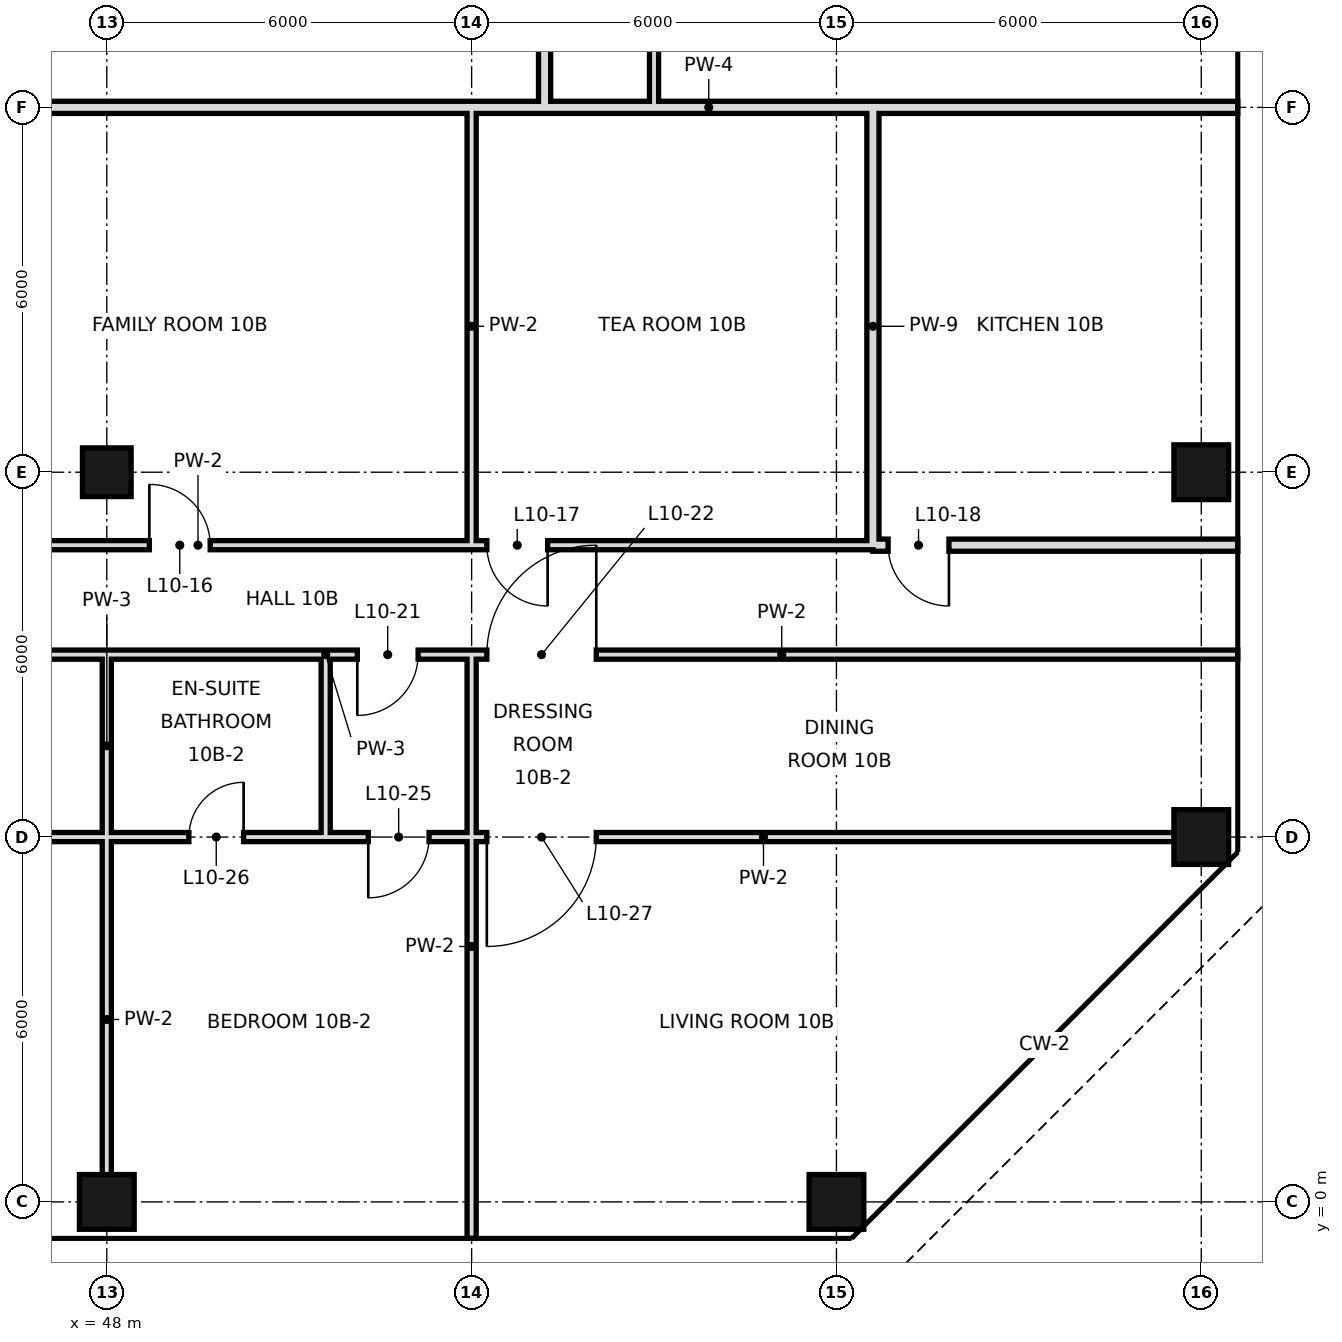
"""IFC4 building model, lengths in metres.
Left out: names, types, materials, properties, quantities, classifications, styles, units other than length and angle.
Written with IfcOpenShell. Run it as: python <this file> out.ifc"""

import sys

from ifc_helpers import new_model, si_unit, direction, frame, frame_2d, origin, origin_2d, place, context, subcontext, project, spatial, rectangle, hollow_rectangle, extrude, element, fill, save


model = new_model("IFC4")
c1 = context("Model", 3, precision=1e-05, world=origin(), true_north=direction((0.0, 1.0)))
c2 = subcontext(c1, "Body", "Model", "MODEL_VIEW")
j1 = project(units=[si_unit("LENGTHUNIT", "METRE"), si_unit("PLANEANGLEUNIT", "RADIAN")], contexts=[c1])
p1 = place(None, origin())
s1 = spatial("IfcSite", under=j1, at=p1, CompositionType="ELEMENT")
p2 = place(p1, origin())
s2 = spatial("IfcBuilding", under=s1, at=p2, CompositionType="ELEMENT")
p3 = place(p2, frame((0.0, 0.0, 57.0)))
s3 = spatial("IfcBuildingStorey", under=s2, at=p3, CompositionType="ELEMENT", Elevation=57.0)
p4 = place(p3, frame((48.0, 0.0, 0.0), z_axis=(0.0, 0.0, 1.0), x_axis=(1.0, 0.0, 0.0)))
e1 = element("IfcColumn", 1, at=p4, inside=s3, PredefinedType="COLUMN", context=c2, shape_type="SweptSolid", body=[
    extrude(hollow_rectangle(XDim=0.9, YDim=0.9, WallThickness=0.045, at=origin_2d()), origin(), (0.0, 0.0, 1.0), 3.6),
])
p5 = place(p3, frame((48.0, 12.0, 0.0), z_axis=(0.0, 0.0, 1.0), x_axis=(1.0, 0.0, 0.0)))
e2 = element("IfcColumn", 2, at=p5, inside=s3, PredefinedType="COLUMN", context=c2, shape_type="SweptSolid", body=[
    extrude(hollow_rectangle(XDim=0.8, YDim=0.8, WallThickness=0.04, at=origin_2d()), origin(), (0.0, 0.0, 1.0), 3.6),
])
for number, where, z_axis, x_axis in (
    (3, (60.0, 0.0, 0.0), (0.0, 0.0, 1.0), (1.0, 0.0, 0.0)),
    (4, (66.0, 6.0, 0.0), (0.0, 0.0, 1.0), (1.0, 0.0, 0.0)),
    (5, (66.0, 12.0, 0.0), (0.0, 0.0, 1.0), (1.0, 0.0, 0.0)),
):
    element("IfcColumn", number, at=place(p3, frame(where, z_axis=z_axis, x_axis=x_axis)), inside=s3, PredefinedType="COLUMN", context=c2, shape_type="SweptSolid", body=[
        extrude(hollow_rectangle(XDim=0.9, YDim=0.9, WallThickness=0.045, at=origin_2d()), origin(), (0.0, 0.0, 1.0), 3.6),
    ])
p6 = place(p3, frame((48.0, 0.0, 0.0), z_axis=(0.0, 0.0, 1.0), x_axis=(0.0, 1.0, 0.0)))
e6 = element("IfcWall", 6, at=p6, inside=s3, PredefinedType="PARTITIONING", context=c2, shape_type="SweptSolid", body=[
    extrude(rectangle(XDim=6.0, YDim=0.15, at=frame_2d((3.0, 0.0))), origin(), (0.0, 0.0, 1.0), 2.72),
])
p7 = place(p3, frame((48.0, 6.0, 0.0), z_axis=(0.0, 0.0, 1.0), x_axis=(0.0, 1.0, 0.0)))
e7 = element("IfcWall", 7, at=p7, inside=s3, PredefinedType="PARTITIONING", context=c2, shape_type="SweptSolid", body=[
    extrude(rectangle(XDim=3.0, YDim=0.15, at=frame_2d((1.5, 0.0))), origin(), (0.0, 0.0, 1.0), 2.72),
])
p8 = place(p3, frame((51.6, 6.0, 0.0), z_axis=(0.0, 0.0, 1.0), x_axis=(0.0, 1.0, 0.0)))
e8 = element("IfcWall", 8, at=p8, inside=s3, PredefinedType="PARTITIONING", context=c2, shape_type="SweptSolid", body=[
    extrude(rectangle(XDim=3.0, YDim=0.15, at=frame_2d((1.5, 0.0))), origin(), (0.0, 0.0, 1.0), 3.42),
])
p9 = place(p3, frame((54.0, -0.6, 0.0), z_axis=(0.0, 0.0, 1.0), x_axis=(0.0, 1.0, 0.0)))
e9 = element("IfcWall", 9, at=p9, inside=s3, PredefinedType="PARTITIONING", context=c2, shape_type="SweptSolid", body=[
    extrude(rectangle(XDim=9.6, YDim=0.15, at=frame_2d((4.8, 0.0))), origin(), (0.0, 0.0, 1.0), 3.42),
])
p10 = place(p3, frame((54.0, 10.8, 0.0), z_axis=(0.0, 0.0, 1.0), x_axis=(0.0, 1.0, 0.0)))
e10 = element("IfcWall", 10, at=p10, inside=s3, PredefinedType="PARTITIONING", context=c2, shape_type="SweptSolid", body=[
    extrude(rectangle(XDim=7.2, YDim=0.15, at=frame_2d((3.6, 0.0))), origin(), (0.0, 0.0, 1.0), 3.42),
])
p11 = place(p3, frame((55.2, 18.0, 0.0), z_axis=(0.0, 0.0, 1.0), x_axis=(0.0, 1.0, 0.0)))
e11 = element("IfcWall", 11, at=p11, inside=s3, PredefinedType="SOLIDWALL", context=c2, shape_type="SweptSolid", body=[
    extrude(rectangle(XDim=3.6, YDim=0.2, at=frame_2d((1.8, 0.0))), origin(), (0.0, 0.0, 1.0), 2.52),
])
p12 = place(p11, frame((1.3, 0.0, 0.0)))
e12 = element("IfcOpeningElement", 12, at=p12, cuts=e11, PredefinedType="OPENING", context=c2, shape_type="SweptSolid", body=[
    extrude(rectangle(XDim=1.0, YDim=2.4, at=frame_2d((0.5, 1.2))), frame((0.0, 0.11, 0.0), z_axis=(0.0, -1.0, 0.0), x_axis=(1.0, 0.0, 0.0)), (0.0, 0.0, 1.0), 0.22),
])
p13 = place(p3, frame((57.0, 18.0, 0.0), z_axis=(0.0, 0.0, 1.0), x_axis=(0.0, 1.0, 0.0)))
e13 = element("IfcWall", 13, at=p13, inside=s3, PredefinedType="PARTITIONING", context=c2, shape_type="SweptSolid", body=[
    extrude(rectangle(XDim=6.0, YDim=0.15, at=frame_2d((3.0, 0.0))), origin(), (0.0, 0.0, 1.0), 3.42),
])
p14 = place(p13, frame((3.4, 0.0, 0.0)))
e14 = element("IfcOpeningElement", 14, at=p14, cuts=e13, PredefinedType="OPENING", context=c2, shape_type="SweptSolid", body=[
    extrude(rectangle(XDim=1.0, YDim=2.4, at=frame_2d((0.5, 1.2))), frame((0.0, 0.085, 0.0), z_axis=(0.0, -1.0, 0.0), x_axis=(1.0, 0.0, 0.0)), (0.0, 0.0, 1.0), 0.17),
])
p15 = place(p3, frame((60.6, 10.8, 0.0), z_axis=(0.0, 0.0, 1.0), x_axis=(0.0, 1.0, 0.0)))
e15 = element("IfcWall", 15, at=p15, inside=s3, PredefinedType="SOLIDWALL", context=c2, shape_type="SweptSolid", body=[
    extrude(rectangle(XDim=7.2, YDim=0.2, at=frame_2d((3.6, 0.0))), origin(), (0.0, 0.0, 1.0), 2.52),
])
p16 = place(p3, frame((60.6, 10.8, 0.0), z_axis=(0.0, 0.0, 1.0), x_axis=(1.0, 0.0, 0.0)))
e16 = element("IfcWall", 16, at=p16, inside=s3, PredefinedType="SOLIDWALL", context=c2, shape_type="SweptSolid", body=[
    extrude(rectangle(XDim=6.0, YDim=0.2, at=frame_2d((3.0, 0.0))), origin(), (0.0, 0.0, 1.0), 2.97),
])
p17 = place(p16, frame((0.25, 0.0, 0.0)))
e17 = element("IfcOpeningElement", 17, at=p17, cuts=e16, PredefinedType="OPENING", context=c2, shape_type="SweptSolid", body=[
    extrude(rectangle(XDim=1.0, YDim=2.4, at=frame_2d((0.5, 1.2))), frame((0.0, 0.11, 0.0), z_axis=(0.0, -1.0, 0.0), x_axis=(1.0, 0.0, 0.0)), (0.0, 0.0, 1.0), 0.22),
])
p18 = place(p3, frame((38.4, 10.8, 0.0), z_axis=(0.0, 0.0, 1.0), x_axis=(1.0, 0.0, 0.0)))
e18 = element("IfcWall", 18, at=p18, inside=s3, PredefinedType="PARTITIONING", context=c2, shape_type="SweptSolid", body=[
    extrude(rectangle(XDim=22.2, YDim=0.15, at=frame_2d((11.1, 0.0))), origin(), (0.0, 0.0, 1.0), 3.42),
])
p19 = place(p18, frame((3.4, 0.0, 0.0)))
e19 = element("IfcOpeningElement", 19, at=p19, cuts=e18, PredefinedType="OPENING", context=c2, shape_type="SweptSolid", body=[
    extrude(rectangle(XDim=1.0, YDim=2.4, at=frame_2d((0.5, 1.2))), frame((0.0, 0.085, 0.0), z_axis=(0.0, -1.0, 0.0), x_axis=(1.0, 0.0, 0.0)), (0.0, 0.0, 1.0), 0.17),
])
p20 = place(p18, frame((10.3, 0.0, 0.0)))
e20 = element("IfcOpeningElement", 20, at=p20, cuts=e18, PredefinedType="OPENING", context=c2, shape_type="SweptSolid", body=[
    extrude(rectangle(XDim=1.0, YDim=2.4, at=frame_2d((0.5, 1.2))), frame((0.0, 0.085, 0.0), z_axis=(0.0, -1.0, 0.0), x_axis=(1.0, 0.0, 0.0)), (0.0, 0.0, 1.0), 0.17),
])
p21 = place(p18, frame((15.85, 0.0, 0.0)))
e21 = element("IfcOpeningElement", 21, at=p21, cuts=e18, PredefinedType="OPENING", context=c2, shape_type="SweptSolid", body=[
    extrude(rectangle(XDim=1.0, YDim=2.4, at=frame_2d((0.5, 1.2))), frame((0.0, 0.085, 0.0), z_axis=(0.0, -1.0, 0.0), x_axis=(1.0, 0.0, 0.0)), (0.0, 0.0, 1.0), 0.17),
])
p22 = place(p3, frame((44.9, 18.0, 0.0), z_axis=(0.0, 0.0, 1.0), x_axis=(1.0, 0.0, 0.0)))
e22 = element("IfcWall", 22, at=p22, inside=s3, PredefinedType="SOLIDWALL", context=c2, shape_type="SweptSolid", body=[
    extrude(rectangle(XDim=10.3, YDim=0.2, at=frame_2d((5.15, 0.0))), origin(), (0.0, 0.0, 1.0), 2.52),
])
p23 = place(p3, frame((60.6, 18.0, 0.0), z_axis=(0.0, 0.0, 1.0), x_axis=(1.0, 0.0, 0.0)))
e23 = element("IfcWall", 23, at=p23, inside=s3, PredefinedType="SOLIDWALL", context=c2, shape_type="SweptSolid", body=[
    extrude(rectangle(XDim=6.0, YDim=0.2, at=frame_2d((3.0, 0.0))), origin(), (0.0, 0.0, 1.0), 2.52),
])
p24 = place(p3, frame((55.2, 18.0, 0.0), z_axis=(0.0, 0.0, 1.0), x_axis=(1.0, 0.0, 0.0)))
e24 = element("IfcWall", 24, at=p24, inside=s3, PredefinedType="SOLIDWALL", context=c2, shape_type="SweptSolid", body=[
    extrude(rectangle(XDim=5.4, YDim=0.2, at=frame_2d((2.7, 0.0))), origin(), (0.0, 0.0, 1.0), 2.52),
])
p25 = place(p3, frame((51.6, 6.0, 0.0), z_axis=(0.0, 0.0, 1.0), x_axis=(1.0, 0.0, 0.0)))
e25 = element("IfcWall", 25, at=p25, inside=s3, PredefinedType="PARTITIONING", context=c2, shape_type="SweptSolid", body=[
    extrude(rectangle(XDim=14.4, YDim=0.15, at=frame_2d((7.2, 0.0))), origin(), (0.0, 0.0, 1.0), 2.52),
])
p26 = place(p25, frame((0.7, 0.0, 0.0)))
e26 = element("IfcOpeningElement", 26, at=p26, cuts=e25, PredefinedType="OPENING", context=c2, shape_type="SweptSolid", body=[
    extrude(rectangle(XDim=1.0, YDim=2.4, at=frame_2d((0.5, 1.2))), frame((0.0, 0.085, 0.0), z_axis=(0.0, -1.0, 0.0), x_axis=(1.0, 0.0, 0.0)), (0.0, 0.0, 1.0), 0.17),
])
p27 = place(p25, frame((2.65, 0.0, 0.0)))
e27 = element("IfcOpeningElement", 27, at=p27, cuts=e25, PredefinedType="OPENING", context=c2, shape_type="SweptSolid", body=[
    extrude(rectangle(XDim=1.8, YDim=2.4, at=frame_2d((0.9, 1.2))), frame((0.0, 0.085, 0.0), z_axis=(0.0, -1.0, 0.0), x_axis=(1.0, 0.0, 0.0)), (0.0, 0.0, 1.0), 0.17),
])
p28 = place(p3, frame((44.4, 6.0, 0.0), z_axis=(0.0, 0.0, 1.0), x_axis=(1.0, 0.0, 0.0)))
e28 = element("IfcWall", 28, at=p28, inside=s3, PredefinedType="PARTITIONING", context=c2, shape_type="SweptSolid", body=[
    extrude(rectangle(XDim=7.2, YDim=0.15, at=frame_2d((3.6, 0.0))), origin(), (0.0, 0.0, 1.0), 2.52),
])
p29 = place(p28, frame((1.35, 0.0, 0.0)))
e29 = element("IfcOpeningElement", 29, at=p29, cuts=e28, PredefinedType="OPENING", context=c2, shape_type="SweptSolid", body=[
    extrude(rectangle(XDim=0.9, YDim=2.4, at=frame_2d((0.45, 1.2))), frame((0.0, 0.085, 0.0), z_axis=(0.0, -1.0, 0.0), x_axis=(1.0, 0.0, 0.0)), (0.0, 0.0, 1.0), 0.17),
])
p30 = place(p28, frame((4.95, 0.0, 0.0)))
e30 = element("IfcOpeningElement", 30, at=p30, cuts=e28, PredefinedType="OPENING", context=c2, shape_type="SweptSolid", body=[
    extrude(rectangle(XDim=0.9, YDim=2.4, at=frame_2d((0.45, 1.2))), frame((0.0, 0.085, 0.0), z_axis=(0.0, -1.0, 0.0), x_axis=(1.0, 0.0, 0.0)), (0.0, 0.0, 1.0), 0.17),
])
p31 = place(p3, frame((51.6, 9.0, 0.0), z_axis=(0.0, 0.0, 1.0), x_axis=(1.0, 0.0, 0.0)))
e31 = element("IfcWall", 31, at=p31, inside=s3, PredefinedType="PARTITIONING", context=c2, shape_type="SweptSolid", body=[
    extrude(rectangle(XDim=15.0, YDim=0.15, at=frame_2d((7.5, 0.0))), origin(), (0.0, 0.0, 1.0), 3.42),
])
p32 = place(p31, frame((0.52, 0.0, 0.0)))
e32 = element("IfcOpeningElement", 32, at=p32, cuts=e31, PredefinedType="OPENING", context=c2, shape_type="SweptSolid", body=[
    extrude(rectangle(XDim=1.0, YDim=2.4, at=frame_2d((0.5, 1.2))), frame((0.0, 0.085, 0.0), z_axis=(0.0, -1.0, 0.0), x_axis=(1.0, 0.0, 0.0)), (0.0, 0.0, 1.0), 0.17),
])
p33 = place(p31, frame((2.65, 0.0, 0.0)))
e33 = element("IfcOpeningElement", 33, at=p33, cuts=e31, PredefinedType="OPENING", context=c2, shape_type="SweptSolid", body=[
    extrude(rectangle(XDim=1.8, YDim=2.4, at=frame_2d((0.9, 1.2))), frame((0.0, 0.085, 0.0), z_axis=(0.0, -1.0, 0.0), x_axis=(1.0, 0.0, 0.0)), (0.0, 0.0, 1.0), 0.17),
])
p34 = place(p3, frame((44.4, 9.0, 0.0), z_axis=(0.0, 0.0, 1.0), x_axis=(1.0, 0.0, 0.0)))
e34 = element("IfcWall", 34, at=p34, inside=s3, PredefinedType="PARTITIONING", context=c2, shape_type="SweptSolid", body=[
    extrude(rectangle(XDim=7.2, YDim=0.15, at=frame_2d((3.6, 0.0))), origin(), (0.0, 0.0, 1.0), 3.42),
])
p35 = place(p20, origin())
e35 = element("IfcDoor", 35, at=p35, inside=s3, OperationType="SINGLE_SWING_LEFT", PredefinedType="DOOR", context=c2, shape_type="SweptSolid", body=[
    extrude(rectangle(XDim=1.0, YDim=2.4, at=frame_2d((0.5, 1.2))), frame((0.0, 0.025, 0.0), z_axis=(0.0, -1.0, 0.0), x_axis=(1.0, 0.0, 0.0)), (0.0, 0.0, 1.0), 0.05),
])
fill(e20, e35)
p36 = place(p21, origin())
e36 = element("IfcDoor", 36, at=p36, inside=s3, OperationType="SINGLE_SWING_RIGHT", PredefinedType="DOOR", context=c2, shape_type="SweptSolid", body=[
    extrude(rectangle(XDim=1.0, YDim=2.4, at=frame_2d((0.5, 1.2))), frame((0.0, 0.025, 0.0), z_axis=(0.0, -1.0, 0.0), x_axis=(1.0, 0.0, 0.0)), (0.0, 0.0, 1.0), 0.05),
])
fill(e21, e36)
p37 = place(p17, origin())
e37 = element("IfcDoor", 37, at=p37, inside=s3, OperationType="SINGLE_SWING_RIGHT", PredefinedType="DOOR", context=c2, shape_type="SweptSolid", body=[
    extrude(rectangle(XDim=1.0, YDim=2.4, at=frame_2d((0.5, 1.2))), frame((0.0, 0.025, 0.0), z_axis=(0.0, -1.0, 0.0), x_axis=(1.0, 0.0, 0.0)), (0.0, 0.0, 1.0), 0.05),
])
fill(e17, e37)
p38 = place(p32, frame((1.0, 0.0, 0.0), z_axis=(0.0, 0.0, 1.0), x_axis=(-1.0, 0.0, 0.0)))
e38 = element("IfcDoor", 38, at=p38, inside=s3, OperationType="SINGLE_SWING_RIGHT", PredefinedType="DOOR", context=c2, shape_type="SweptSolid", body=[
    extrude(rectangle(XDim=1.0, YDim=2.4, at=frame_2d((0.5, 1.2))), frame((0.0, 0.025, 0.0), z_axis=(0.0, -1.0, 0.0), x_axis=(1.0, 0.0, 0.0)), (0.0, 0.0, 1.0), 0.05),
])
fill(e32, e38)
p39 = place(p33, frame((1.8, 0.0, 0.0), z_axis=(0.0, 0.0, 1.0), x_axis=(-1.0, 0.0, 0.0)))
e39 = element("IfcDoor", 39, at=p39, inside=s3, OperationType="SINGLE_SWING_LEFT", PredefinedType="DOOR", context=c2, shape_type="SweptSolid", body=[
    extrude(rectangle(XDim=1.8, YDim=2.4, at=frame_2d((0.9, 1.2))), frame((0.0, 0.025, 0.0), z_axis=(0.0, -1.0, 0.0), x_axis=(1.0, 0.0, 0.0)), (0.0, 0.0, 1.0), 0.05),
])
fill(e33, e39)
p40 = place(p26, frame((1.0, 0.0, 0.0), z_axis=(0.0, 0.0, 1.0), x_axis=(-1.0, 0.0, 0.0)))
e40 = element("IfcDoor", 40, at=p40, inside=s3, OperationType="SINGLE_SWING_RIGHT", PredefinedType="DOOR", context=c2, shape_type="SweptSolid", body=[
    extrude(rectangle(XDim=1.0, YDim=2.4, at=frame_2d((0.5, 1.2))), frame((0.0, 0.025, 0.0), z_axis=(0.0, -1.0, 0.0), x_axis=(1.0, 0.0, 0.0)), (0.0, 0.0, 1.0), 0.05),
])
fill(e26, e40)
p41 = place(p30, frame((0.9, 0.0, 0.0), z_axis=(0.0, 0.0, 1.0), x_axis=(-1.0, 0.0, 0.0)))
e41 = element("IfcDoor", 41, at=p41, inside=s3, OperationType="SINGLE_SWING_LEFT", PredefinedType="DOOR", context=c2, shape_type="SweptSolid", body=[
    extrude(rectangle(XDim=0.9, YDim=2.4, at=frame_2d((0.45, 1.2))), frame((0.0, 0.025, 0.0), z_axis=(0.0, -1.0, 0.0), x_axis=(1.0, 0.0, 0.0)), (0.0, 0.0, 1.0), 0.05),
])
fill(e30, e41)
p42 = place(p27, frame((1.8, 0.0, 0.0), z_axis=(0.0, 0.0, 1.0), x_axis=(-1.0, 0.0, 0.0)))
e42 = element("IfcDoor", 42, at=p42, inside=s3, OperationType="SINGLE_SWING_RIGHT", PredefinedType="DOOR", context=c2, shape_type="SweptSolid", body=[
    extrude(rectangle(XDim=1.8, YDim=2.4, at=frame_2d((0.9, 1.2))), frame((0.0, 0.025, 0.0), z_axis=(0.0, -1.0, 0.0), x_axis=(1.0, 0.0, 0.0)), (0.0, 0.0, 1.0), 0.05),
])
fill(e27, e42)
save(model, sys.argv[1])
